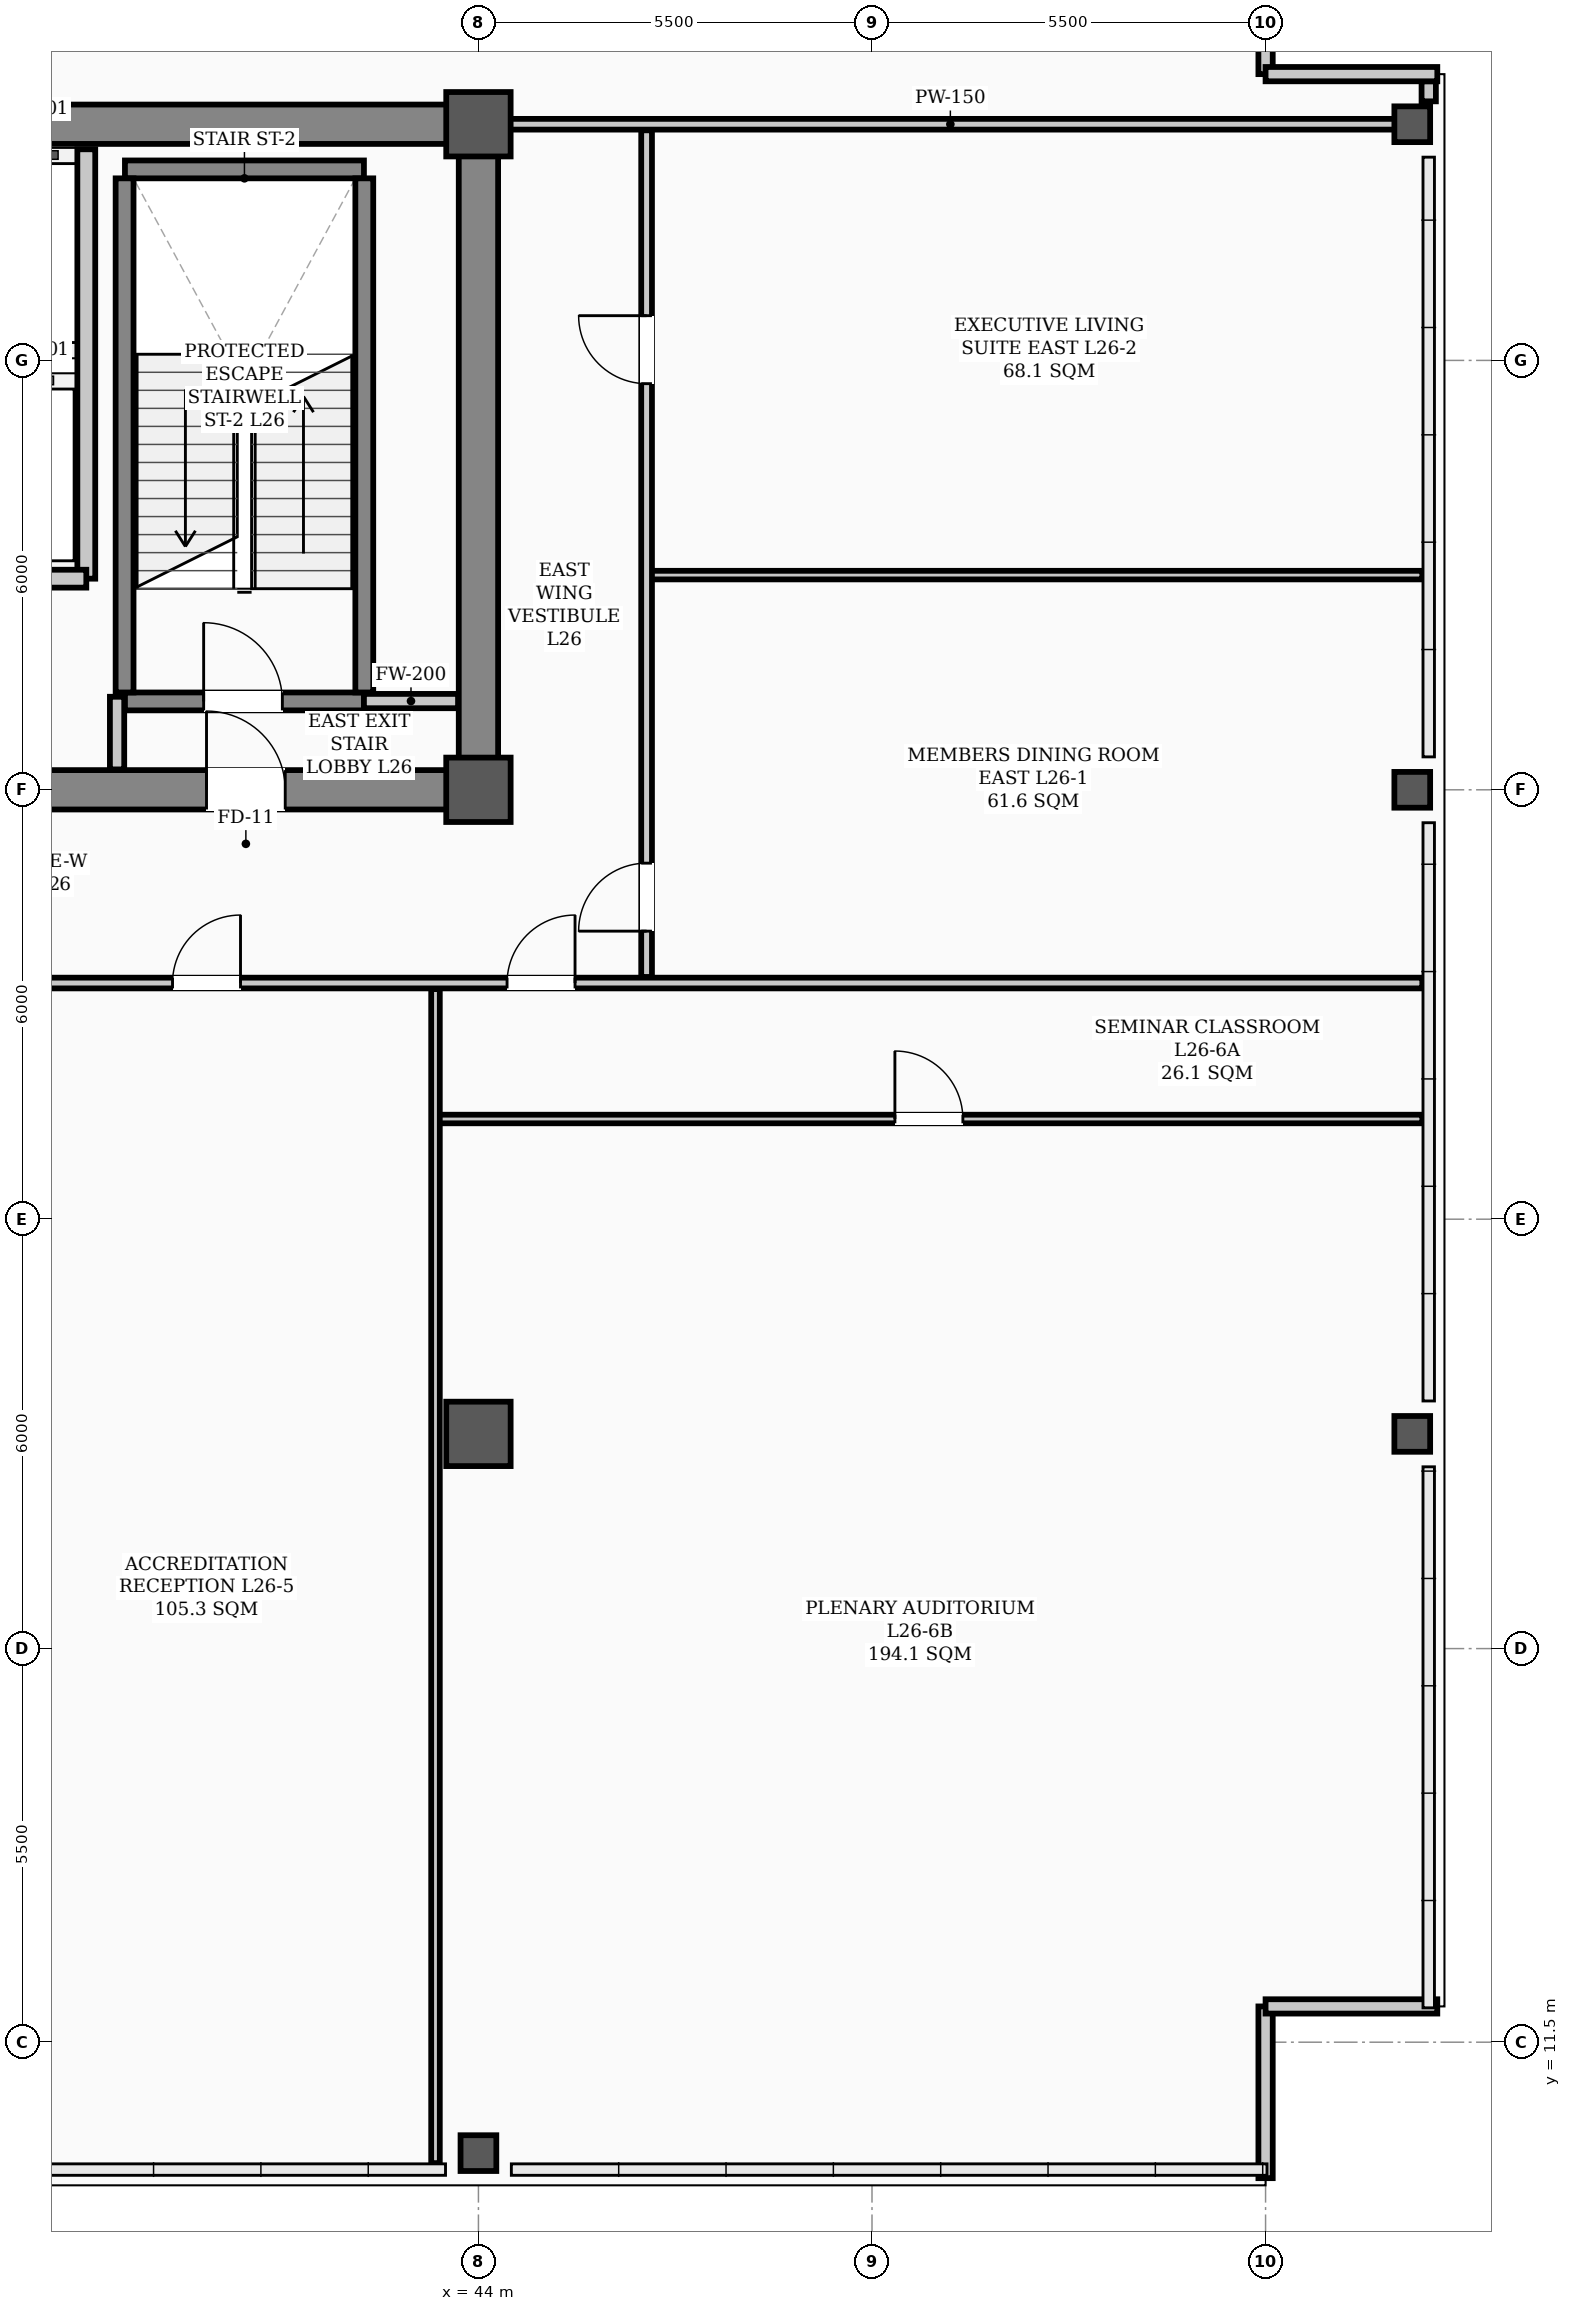
"""IFC4 building model, lengths in metres.
Left out: names, types, materials, properties, quantities, classifications, styles, units other than length and angle.
Written with IfcOpenShell. Run it as: python <this file> out.ifc"""

import sys

from ifc_helpers import new_model, si_unit, direction, frame, frame_2d, origin, origin_2d, place, context, subcontext, project, spatial, rectangle, hollow_rectangle, extrude, element, fill, save


model = new_model("IFC4")
c1 = context("Model", 3, precision=1e-05, world=origin(), true_north=direction((0.0, 1.0)))
c2 = subcontext(c1, "Body", "Model", "MODEL_VIEW")
j1 = project(units=[si_unit("LENGTHUNIT", "METRE"), si_unit("PLANEANGLEUNIT", "RADIAN")], contexts=[c1])
p1 = place(None, origin())
s1 = spatial("IfcSite", under=j1, at=p1, CompositionType="ELEMENT")
p2 = place(p1, origin())
s2 = spatial("IfcBuilding", under=s1, at=p2, CompositionType="ELEMENT")
p3 = place(p2, frame((0.0, 0.0, 106.0)))
s3 = spatial("IfcBuildingStorey", under=s2, at=p3, CompositionType="ELEMENT", Elevation=106.0)
for number, where, z_axis, x_axis in (
    (1, (44.0, 29.0, 0.0), (0.0, 0.0, 1.0), (1.0, 0.0, 0.0)),
    (2, (44.0, 38.3, 0.0), (0.0, 0.0, 1.0), (1.0, 0.0, 0.0)),
    (3, (44.0, 20.0, 0.0), (0.0, 0.0, 1.0), (1.0, 0.0, 0.0)),
):
    element("IfcColumn", number, at=place(p3, frame(where, z_axis=z_axis, x_axis=x_axis)), inside=s3, PredefinedType="COLUMN", context=c2, shape_type="SweptSolid", body=[
        extrude(hollow_rectangle(XDim=0.9, YDim=0.9, WallThickness=0.035, InnerFilletRadius=0.017, OuterFilletRadius=0.052, at=origin_2d()), origin(), (0.0, 0.0, 1.0), 5.0),
    ])
for number, where, z_axis, x_axis in (
    (4, (44.0, 9.95, 0.0), (0.0, 0.0, 1.0), (1.0, 0.0, 0.0)),
    (5, (57.05, 20.0, 0.0), (0.0, 0.0, 1.0), (1.0, 0.0, 0.0)),
    (6, (57.05, 29.0, 0.0), (0.0, 0.0, 1.0), (1.0, 0.0, 0.0)),
    (7, (57.05, 38.3, 0.0), (0.0, 0.0, 1.0), (1.0, 0.0, 0.0)),
):
    element("IfcColumn", number, at=place(p3, frame(where, z_axis=z_axis, x_axis=x_axis)), inside=s3, PredefinedType="COLUMN", context=c2, shape_type="SweptSolid", body=[
        extrude(hollow_rectangle(XDim=0.5, YDim=0.5, WallThickness=0.024, InnerFilletRadius=0.012, OuterFilletRadius=0.036, at=origin_2d()), origin(), (0.0, 0.0, 1.0), 5.0),
    ])
p4 = place(p3, frame((57.28, 38.62, 0.0), z_axis=(0.0, 0.0, 1.0), x_axis=(0.0, 1.0, 0.0)))
e8 = element("IfcWall", 8, at=p4, inside=s3, PredefinedType="PARAPET", context=c2, shape_type="SweptSolid", body=[
    extrude(rectangle(XDim=0.28, YDim=0.2, at=frame_2d((0.14, 0.0))), origin(), (0.0, 0.0, 1.0), 1.2),
])
for number, where, z_axis, x_axis in (
    (9, (55.0, 9.6, 0.0), (0.0, 0.0, 1.0), (0.0, 1.0, 0.0)),
    (10, (55.0, 12.0, 0.0), (0.0, 0.0, 1.0), (1.0, 0.0, 0.0)),
    (11, (55.0, 41.4, 0.0), (0.0, 0.0, 1.0), (0.0, -1.0, 0.0)),
    (12, (55.0, 39.0, 0.0), (0.0, 0.0, 1.0), (1.0, 0.0, 0.0)),
):
    element("IfcWall", number, at=place(p3, frame(where, z_axis=z_axis, x_axis=x_axis)), inside=s3, PredefinedType="PARAPET", context=c2, shape_type="SweptSolid", body=[
        extrude(rectangle(XDim=2.4, YDim=0.2, at=frame_2d((1.2, 0.0))), origin(), (0.0, 0.0, 1.0), 1.2),
    ])
p5 = place(p3, frame((13.5, 29.0, 0.0), z_axis=(0.0, 0.0, 1.0), x_axis=(1.0, 0.0, 0.0)))
e13 = element("IfcWall", 13, at=p5, inside=s3, PredefinedType="SHEAR", context=c2, shape_type="SweptSolid", body=[
    extrude(rectangle(XDim=30.5, YDim=0.55, at=frame_2d((15.25, 0.0))), origin(), (0.0, 0.0, 1.0), 4.82),
])
p6 = place(p5, frame((1.75, 0.0, 0.0)))
e14 = element("IfcOpeningElement", 14, at=p6, cuts=e13, PredefinedType="OPENING", context=c2, shape_type="SweptSolid", body=[
    extrude(rectangle(XDim=1.1, YDim=2.08, at=frame_2d((0.55, 1.04))), frame((0.0, 0.285, 0.0), z_axis=(0.0, -1.0, 0.0), x_axis=(1.0, 0.0, 0.0)), (0.0, 0.0, 1.0), 0.57),
])
p7 = place(p5, frame((26.7, 0.0, 0.0)))
e15 = element("IfcOpeningElement", 15, at=p7, cuts=e13, PredefinedType="OPENING", context=c2, shape_type="SweptSolid", body=[
    extrude(rectangle(XDim=1.1, YDim=2.08, at=frame_2d((0.55, 1.04))), frame((0.0, 0.285, 0.0), z_axis=(0.0, -1.0, 0.0), x_axis=(1.0, 0.0, 0.0)), (0.0, 0.0, 1.0), 0.57),
])
p8 = place(p5, frame((6.8, 0.0, 0.0)))
e16 = element("IfcOpeningElement", 16, at=p8, cuts=e13, PredefinedType="OPENING", context=c2, shape_type="SweptSolid", body=[
    extrude(rectangle(XDim=1.1, YDim=2.08, at=frame_2d((0.55, 1.04))), frame((0.0, 0.285, 0.0), z_axis=(0.0, -1.0, 0.0), x_axis=(1.0, 0.0, 0.0)), (0.0, 0.0, 1.0), 0.57),
])
p9 = place(p5, frame((13.2, 0.0, 0.0)))
e17 = element("IfcOpeningElement", 17, at=p9, cuts=e13, PredefinedType="OPENING", context=c2, shape_type="SweptSolid", body=[
    extrude(rectangle(XDim=1.6, YDim=2.08, at=frame_2d((0.8, 1.04))), frame((0.0, 0.285, 0.0), z_axis=(0.0, -1.0, 0.0), x_axis=(1.0, 0.0, 0.0)), (0.0, 0.0, 1.0), 0.57),
])
p10 = place(p5, frame((20.525, 0.0, 0.0)))
e18 = element("IfcOpeningElement", 18, at=p10, cuts=e13, PredefinedType="OPENING", context=c2, shape_type="SweptSolid", body=[
    extrude(rectangle(XDim=0.95, YDim=2.08, at=frame_2d((0.475, 1.04))), frame((0.0, 0.285, 0.0), z_axis=(0.0, -1.0, 0.0), x_axis=(1.0, 0.0, 0.0)), (0.0, 0.0, 1.0), 0.57),
])
p11 = place(p3, frame((13.5, 38.3, 0.0), z_axis=(0.0, 0.0, 1.0), x_axis=(1.0, 0.0, 0.0)))
e19 = element("IfcWall", 19, at=p11, inside=s3, PredefinedType="SHEAR", context=c2, shape_type="SweptSolid", body=[
    extrude(rectangle(XDim=30.5, YDim=0.55, at=frame_2d((15.25, 0.0))), origin(), (0.0, 0.0, 1.0), 4.82),
])
p12 = place(p3, frame((44.0, 29.35, 0.0), z_axis=(0.0, 0.0, 1.0), x_axis=(0.0, 1.0, 0.0)))
e20 = element("IfcWall", 20, at=p12, inside=s3, PredefinedType="SHEAR", context=c2, shape_type="SweptSolid", body=[
    extrude(rectangle(XDim=8.6, YDim=0.55, at=frame_2d((4.3, 0.0))), origin(), (0.0, 0.0, 1.0), 4.82),
])
p13 = place(p3, frame((39.06, 30.235, 0.0), z_axis=(0.0, 0.0, 1.0), x_axis=(1.0, 0.0, 0.0)))
e21 = element("IfcWall", 21, at=p13, inside=s3, PredefinedType="STANDARD", context=c2, shape_type="SweptSolid", body=[
    extrude(rectangle(XDim=3.34, YDim=0.25, at=frame_2d((1.67, 0.0))), origin(), (0.0, 0.0, 1.0), 4.82),
])
p14 = place(p13, frame((1.1, 0.0, 0.0)))
e22 = element("IfcOpeningElement", 22, at=p14, cuts=e21, PredefinedType="OPENING", context=c2, shape_type="SweptSolid", body=[
    extrude(rectangle(XDim=1.1, YDim=2.08, at=frame_2d((0.55, 1.04))), frame((0.0, 0.135, 0.0), z_axis=(0.0, -1.0, 0.0), x_axis=(1.0, 0.0, 0.0)), (0.0, 0.0, 1.0), 0.27),
])
p15 = place(p3, frame((39.06, 37.669, 0.0), z_axis=(0.0, 0.0, 1.0), x_axis=(1.0, 0.0, 0.0)))
e23 = element("IfcWall", 23, at=p15, inside=s3, PredefinedType="STANDARD", context=c2, shape_type="SweptSolid", body=[
    extrude(rectangle(XDim=3.34, YDim=0.25, at=frame_2d((1.67, 0.0))), origin(), (0.0, 0.0, 1.0), 4.82),
])
for number, where, z_axis, x_axis in (
    (24, (39.055, 30.36, 0.0), (0.0, 0.0, 1.0), (0.0, 1.0, 0.0)),
    (25, (42.405, 30.36, 0.0), (0.0, 0.0, 1.0), (0.0, 1.0, 0.0)),
):
    element("IfcWall", number, at=place(p3, frame(where, z_axis=z_axis, x_axis=x_axis)), inside=s3, PredefinedType="STANDARD", context=c2, shape_type="SweptSolid", body=[
        extrude(rectangle(XDim=7.184, YDim=0.25, at=frame_2d((3.592, 0.0))), origin(), (0.0, 0.0, 1.0), 4.82),
    ])
p16 = place(p3, frame((38.52, 31.95, 0.0), z_axis=(0.0, 0.0, 1.0), x_axis=(0.0, 1.0, 0.0)))
e26 = element("IfcWall", 26, at=p16, inside=s3, PredefinedType="STANDARD", context=c2, shape_type="SweptSolid", body=[
    extrude(rectangle(XDim=6.0, YDim=0.25, at=frame_2d((3.0, 0.0))), origin(), (0.0, 0.0, 1.0), 4.4),
])
p17 = place(p3, frame((36.62, 31.95, 0.0), z_axis=(0.0, 0.0, 1.0), x_axis=(1.0, 0.0, 0.0)))
e27 = element("IfcWall", 27, at=p17, inside=s3, PredefinedType="STANDARD", context=c2, shape_type="SweptSolid", body=[
    extrude(rectangle(XDim=1.9, YDim=0.25, at=frame_2d((0.95, 0.0))), origin(), (0.0, 0.0, 1.0), 4.58),
])
p18 = place(p3, frame((42.4, 30.24, 0.0), z_axis=(0.0, 0.0, 1.0), x_axis=(1.0, 0.0, 0.0)))
e28 = element("IfcWall", 28, at=p18, inside=s3, PredefinedType="STANDARD", context=c2, shape_type="SweptSolid", body=[
    extrude(rectangle(XDim=1.315, YDim=0.2, at=frame_2d((0.658, 0.0))), origin(), (0.0, 0.0, 1.0), 4.2),
])
p19 = place(p3, frame((7.81, 26.3, 0.0), z_axis=(0.0, 0.0, 1.0), x_axis=(1.0, 0.0, 0.0)))
e29 = element("IfcWall", 29, at=p19, inside=s3, PredefinedType="PARTITIONING", context=c2, shape_type="SweptSolid", body=[
    extrude(rectangle(XDim=49.38, YDim=0.15, at=frame_2d((24.69, 0.0))), origin(), (0.0, 0.0, 1.0), 4.2),
])
p20 = place(p19, frame((6.89, 0.0, 0.0)))
e30 = element("IfcOpeningElement", 30, at=p20, cuts=e29, PredefinedType="OPENING", context=c2, shape_type="SweptSolid", body=[
    extrude(rectangle(XDim=0.95, YDim=2.08, at=frame_2d((0.475, 1.04))), frame((0.0, 0.085, 0.0), z_axis=(0.0, -1.0, 0.0), x_axis=(1.0, 0.0, 0.0)), (0.0, 0.0, 1.0), 0.17),
])
p21 = place(p19, frame((12.315, 0.0, 0.0)))
e31 = element("IfcOpeningElement", 31, at=p21, cuts=e29, PredefinedType="OPENING", context=c2, shape_type="SweptSolid", body=[
    extrude(rectangle(XDim=0.95, YDim=2.08, at=frame_2d((0.475, 1.04))), frame((0.0, 0.085, 0.0), z_axis=(0.0, -1.0, 0.0), x_axis=(1.0, 0.0, 0.0)), (0.0, 0.0, 1.0), 0.17),
])
p22 = place(p19, frame((18.815, 0.0, 0.0)))
e32 = element("IfcOpeningElement", 32, at=p22, cuts=e29, PredefinedType="OPENING", context=c2, shape_type="SweptSolid", body=[
    extrude(rectangle(XDim=0.95, YDim=2.08, at=frame_2d((0.475, 1.04))), frame((0.0, 0.085, 0.0), z_axis=(0.0, -1.0, 0.0), x_axis=(1.0, 0.0, 0.0)), (0.0, 0.0, 1.0), 0.17),
])
p23 = place(p19, frame((25.415, 0.0, 0.0)))
e33 = element("IfcOpeningElement", 33, at=p23, cuts=e29, PredefinedType="OPENING", context=c2, shape_type="SweptSolid", body=[
    extrude(rectangle(XDim=0.95, YDim=2.08, at=frame_2d((0.475, 1.04))), frame((0.0, 0.085, 0.0), z_axis=(0.0, -1.0, 0.0), x_axis=(1.0, 0.0, 0.0)), (0.0, 0.0, 1.0), 0.17),
])
p24 = place(p19, frame((31.915, 0.0, 0.0)))
e34 = element("IfcOpeningElement", 34, at=p24, cuts=e29, PredefinedType="OPENING", context=c2, shape_type="SweptSolid", body=[
    extrude(rectangle(XDim=0.95, YDim=2.08, at=frame_2d((0.475, 1.04))), frame((0.0, 0.085, 0.0), z_axis=(0.0, -1.0, 0.0), x_axis=(1.0, 0.0, 0.0)), (0.0, 0.0, 1.0), 0.17),
])
p25 = place(p19, frame((36.59, 0.0, 0.0)))
e35 = element("IfcOpeningElement", 35, at=p25, cuts=e29, PredefinedType="OPENING", context=c2, shape_type="SweptSolid", body=[
    extrude(rectangle(XDim=0.95, YDim=2.08, at=frame_2d((0.475, 1.04))), frame((0.0, 0.085, 0.0), z_axis=(0.0, -1.0, 0.0), x_axis=(1.0, 0.0, 0.0)), (0.0, 0.0, 1.0), 0.17),
])
p26 = place(p3, frame((44.0, 38.3, 0.0), z_axis=(0.0, 0.0, 1.0), x_axis=(1.0, 0.0, 0.0)))
e36 = element("IfcWall", 36, at=p26, inside=s3, PredefinedType="PARTITIONING", context=c2, shape_type="SweptSolid", body=[
    extrude(rectangle(XDim=13.19, YDim=0.15, at=frame_2d((6.595, 0.0))), origin(), (0.0, 0.0, 1.0), 4.1),
])
p27 = place(p3, frame((43.4, 24.4, 0.0), z_axis=(0.0, 0.0, 1.0), x_axis=(1.0, 0.0, 0.0)))
e37 = element("IfcWall", 37, at=p27, inside=s3, PredefinedType="PARTITIONING", context=c2, shape_type="SweptSolid", body=[
    extrude(rectangle(XDim=13.79, YDim=0.12, at=frame_2d((6.895, 0.0))), origin(), (0.0, 0.0, 1.0), 4.2),
])
p28 = place(p27, frame((6.42, 0.0, 0.0)))
e38 = element("IfcOpeningElement", 38, at=p28, cuts=e37, PredefinedType="OPENING", context=c2, shape_type="SweptSolid", body=[
    extrude(rectangle(XDim=0.95, YDim=2.08, at=frame_2d((0.475, 1.04))), frame((0.0, 0.07, 0.0), z_axis=(0.0, -1.0, 0.0), x_axis=(1.0, 0.0, 0.0)), (0.0, 0.0, 1.0), 0.14),
])
p29 = place(p3, frame((46.35, 32.0, 0.0), z_axis=(0.0, 0.0, 1.0), x_axis=(1.0, 0.0, 0.0)))
e39 = element("IfcWall", 39, at=p29, inside=s3, PredefinedType="PARTITIONING", context=c2, shape_type="SweptSolid", body=[
    extrude(rectangle(XDim=10.84, YDim=0.12, at=frame_2d((5.42, 0.0))), origin(), (0.0, 0.0, 1.0), 4.312),
])
p30 = place(p3, frame((38.95, 29.285, 0.0), z_axis=(0.0, 0.0, 1.0), x_axis=(0.0, 1.0, 0.0)))
e40 = element("IfcWall", 40, at=p30, inside=s3, PredefinedType="STANDARD", context=c2, shape_type="SweptSolid", body=[
    extrude(rectangle(XDim=1.015, YDim=0.2, at=frame_2d((0.508, 0.0))), origin(), (0.0, 0.0, 1.0), 4.4),
])
p31 = place(p3, frame((46.35, 26.385, 0.0), z_axis=(0.0, 0.0, 1.0), x_axis=(0.0, 1.0, 0.0)))
e41 = element("IfcWall", 41, at=p31, inside=s3, PredefinedType="PARTITIONING", context=c2, shape_type="SweptSolid", body=[
    extrude(rectangle(XDim=11.83, YDim=0.15, at=frame_2d((5.915, 0.0))), origin(), (0.0, 0.0, 1.0), 4.1),
])
p32 = place(p31, frame((0.64, 0.0, 0.0)))
e42 = element("IfcOpeningElement", 42, at=p32, cuts=e41, PredefinedType="OPENING", context=c2, shape_type="SweptSolid", body=[
    extrude(rectangle(XDim=0.95, YDim=2.08, at=frame_2d((0.475, 1.04))), frame((0.0, 0.085, 0.0), z_axis=(0.0, -1.0, 0.0), x_axis=(1.0, 0.0, 0.0)), (0.0, 0.0, 1.0), 0.17),
])
p33 = place(p31, frame((8.29, 0.0, 0.0)))
e43 = element("IfcOpeningElement", 43, at=p33, cuts=e41, PredefinedType="OPENING", context=c2, shape_type="SweptSolid", body=[
    extrude(rectangle(XDim=0.95, YDim=2.08, at=frame_2d((0.475, 1.04))), frame((0.0, 0.085, 0.0), z_axis=(0.0, -1.0, 0.0), x_axis=(1.0, 0.0, 0.0)), (0.0, 0.0, 1.0), 0.17),
])
p34 = place(p3, frame((43.4, 9.81, 0.0), z_axis=(0.0, 0.0, 1.0), x_axis=(0.0, 1.0, 0.0)))
e44 = element("IfcWall", 44, at=p34, inside=s3, PredefinedType="PARTITIONING", context=c2, shape_type="SweptSolid", body=[
    extrude(rectangle(XDim=16.405, YDim=0.12, at=frame_2d((8.203, 0.0))), origin(), (0.0, 0.0, 1.0), 4.1),
])
p35 = place(p14, origin())
e45 = element("IfcDoor", 45, at=p35, inside=s3, OperationType="SINGLE_SWING_LEFT", PredefinedType="DOOR", context=c2, shape_type="SweptSolid", body=[
    extrude(rectangle(XDim=1.1, YDim=2.08, at=frame_2d((0.55, 1.04))), frame((0.0, 0.025, 0.0), z_axis=(0.0, -1.0, 0.0), x_axis=(1.0, 0.0, 0.0)), (0.0, 0.0, 1.0), 0.05),
])
fill(e22, e45)
p36 = place(p7, origin())
e46 = element("IfcDoor", 46, at=p36, inside=s3, OperationType="SINGLE_SWING_LEFT", PredefinedType="DOOR", context=c2, shape_type="SweptSolid", body=[
    extrude(rectangle(XDim=1.1, YDim=2.08, at=frame_2d((0.55, 1.04))), frame((0.0, 0.025, 0.0), z_axis=(0.0, -1.0, 0.0), x_axis=(1.0, 0.0, 0.0)), (0.0, 0.0, 1.0), 0.05),
])
fill(e15, e46)
p37 = place(p24, origin())
e47 = element("IfcDoor", 47, at=p37, inside=s3, OperationType="SINGLE_SWING_RIGHT", PredefinedType="DOOR", context=c2, shape_type="SweptSolid", body=[
    extrude(rectangle(XDim=0.95, YDim=2.08, at=frame_2d((0.475, 1.04))), frame((0.0, 0.025, 0.0), z_axis=(0.0, -1.0, 0.0), x_axis=(1.0, 0.0, 0.0)), (0.0, 0.0, 1.0), 0.05),
])
fill(e34, e47)
p38 = place(p28, origin())
e48 = element("IfcDoor", 48, at=p38, inside=s3, OperationType="SINGLE_SWING_LEFT", PredefinedType="DOOR", context=c2, shape_type="SweptSolid", body=[
    extrude(rectangle(XDim=0.95, YDim=2.08, at=frame_2d((0.475, 1.04))), frame((0.0, 0.025, 0.0), z_axis=(0.0, -1.0, 0.0), x_axis=(1.0, 0.0, 0.0)), (0.0, 0.0, 1.0), 0.05),
])
fill(e38, e48)
p39 = place(p25, origin())
e49 = element("IfcDoor", 49, at=p39, inside=s3, OperationType="SINGLE_SWING_RIGHT", PredefinedType="DOOR", context=c2, shape_type="SweptSolid", body=[
    extrude(rectangle(XDim=0.95, YDim=2.08, at=frame_2d((0.475, 1.04))), frame((0.0, 0.025, 0.0), z_axis=(0.0, -1.0, 0.0), x_axis=(1.0, 0.0, 0.0)), (0.0, 0.0, 1.0), 0.05),
])
fill(e35, e49)
p40 = place(p32, origin())
e50 = element("IfcDoor", 50, at=p40, inside=s3, OperationType="SINGLE_SWING_LEFT", PredefinedType="DOOR", context=c2, shape_type="SweptSolid", body=[
    extrude(rectangle(XDim=0.95, YDim=2.08, at=frame_2d((0.475, 1.04))), frame((0.0, 0.025, 0.0), z_axis=(0.0, -1.0, 0.0), x_axis=(1.0, 0.0, 0.0)), (0.0, 0.0, 1.0), 0.05),
])
fill(e42, e50)
p41 = place(p33, origin())
e51 = element("IfcDoor", 51, at=p41, inside=s3, OperationType="SINGLE_SWING_RIGHT", PredefinedType="DOOR", context=c2, shape_type="SweptSolid", body=[
    extrude(rectangle(XDim=0.95, YDim=2.08, at=frame_2d((0.475, 1.04))), frame((0.0, 0.025, 0.0), z_axis=(0.0, -1.0, 0.0), x_axis=(1.0, 0.0, 0.0)), (0.0, 0.0, 1.0), 0.05),
])
fill(e43, e51)
save(model, sys.argv[1])
